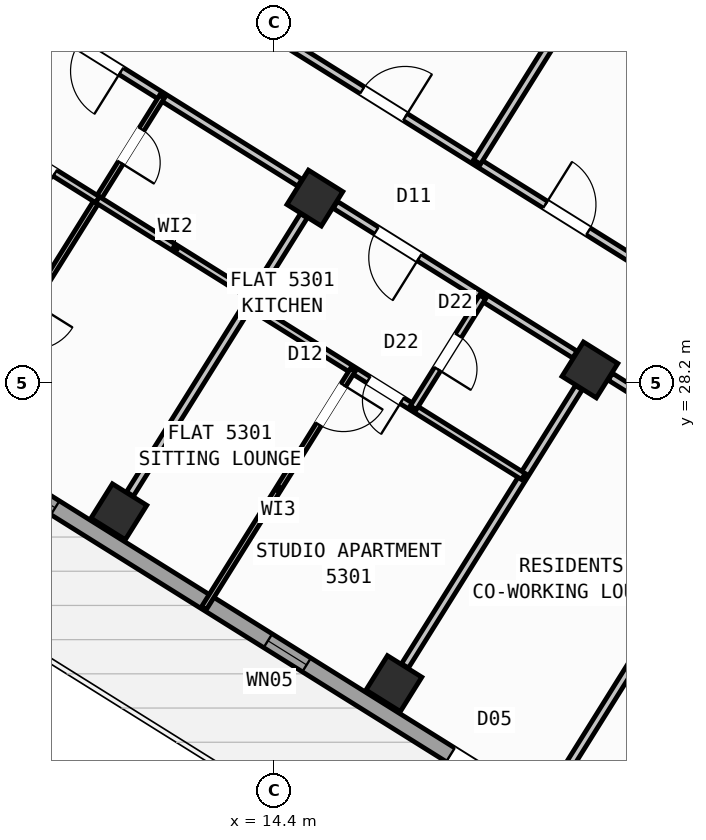
"""IFC4 building model, lengths in metres.
Left out: names, types, materials, properties, quantities, classifications, styles, units other than length and angle.
Written with IfcOpenShell. Run it as: python <this file> out.ifc"""

import sys

from ifc_helpers import new_model, si_unit, direction, frame, frame_2d, origin, origin_2d, place, context, subcontext, project, spatial, rectangle, hollow_rectangle, extrude, source, transform, mapped, element, fill, save


model = new_model("IFC4")
c1 = context("Model", 3, precision=1e-05, world=origin(), true_north=direction((0.0, 1.0)))
c2 = subcontext(c1, "Body", "Model", "MODEL_VIEW")
j1 = project(units=[si_unit("LENGTHUNIT", "METRE"), si_unit("PLANEANGLEUNIT", "RADIAN")], contexts=[c1])
p1 = place(None, origin())
s1 = spatial("IfcSite", under=j1, at=p1, CompositionType="ELEMENT")
p2 = place(p1, origin())
s2 = spatial("IfcBuilding", under=s1, at=p2, CompositionType="ELEMENT")
p3 = place(p2, frame((0.0, 0.0, 211.2)))
s3 = spatial("IfcBuildingStorey", under=s2, at=p3, CompositionType="ELEMENT", Elevation=211.2)
m1 = source(origin(), c2, "Body", "SweptSolid", [
    extrude(hollow_rectangle(XDim=0.8, YDim=0.8, WallThickness=0.032, at=origin_2d()), origin(), (0.0, 0.0, 1.0), 3.6),
])
for number, where, z_axis, x_axis in (
    (1, (20.632, 28.452, 0.0), (0.0, 0.0, 1.0), (-0.848, 0.53, 0.0)),
    (2, (16.764, 22.261, 0.0), (0.0, 0.0, 1.0), (-0.848, 0.53, 0.0)),
    (3, (15.205, 31.844, 0.0), (0.0, 0.0, 1.0), (-0.848, 0.53, 0.0)),
    (4, (11.336, 25.653, 0.0), (0.0, 0.0, 1.0), (-0.848, 0.53, 0.0)),
    (5, (9.777, 35.235, 0.0), (0.0, 0.0, 1.0), (-0.848, 0.53, 0.0)),
):
    element("IfcColumn", number, at=place(p3, frame(where, z_axis=z_axis, x_axis=x_axis)), inside=s3, PredefinedType="COLUMN", context=c2, shape_type="MappedRepresentation", body=[
        mapped(m1, transform((0.0, 0.0, 0.0), scale=1.0)),
    ])
p4 = place(p3, frame((31.76, 12.183, 0.0), z_axis=(0.0, 0.0, 1.0), x_axis=(-0.848047074256, 0.529920899612, 0.0)))
e6 = element("IfcWall", 6, at=p4, inside=s3, PredefinedType="STANDARD", context=c2, shape_type="SweptSolid", body=[
    extrude(rectangle(XDim=30.652, YDim=0.32, at=frame_2d((15.326, 0.0))), origin(), (0.0, 0.0, 1.0), 3.35),
])
p5 = place(p4, frame((15.166, 0.0, 0.0)))
e7 = element("IfcOpeningElement", 7, at=p5, cuts=e6, PredefinedType="OPENING", context=c2, shape_type="SweptSolid", body=[
    extrude(rectangle(XDim=1.2, YDim=2.15, at=frame_2d((0.6, 1.075))), frame((0.0, 0.17, 0.0), z_axis=(0.0, -1.0, 0.0), x_axis=(1.0, 0.0, 0.0)), (0.0, 0.0, 1.0), 0.34),
])
p6 = place(p4, frame((2.24, 0.0, 0.9)))
e8 = element("IfcOpeningElement", 8, at=p6, cuts=e6, PredefinedType="OPENING", context=c2, shape_type="SweptSolid", body=[
    extrude(rectangle(XDim=1.65, YDim=1.45, at=frame_2d((0.825, 0.725))), frame((0.0, 0.17, 0.0), z_axis=(0.0, -1.0, 0.0), x_axis=(1.0, 0.0, 0.0)), (0.0, 0.0, 1.0), 0.34),
])
p7 = place(p4, frame((7.469, 0.0, 0.9)))
e9 = element("IfcOpeningElement", 9, at=p7, cuts=e6, PredefinedType="OPENING", context=c2, shape_type="SweptSolid", body=[
    extrude(rectangle(XDim=1.65, YDim=1.45, at=frame_2d((0.825, 0.725))), frame((0.0, 0.17, 0.0), z_axis=(0.0, -1.0, 0.0), x_axis=(1.0, 0.0, 0.0)), (0.0, 0.0, 1.0), 0.34),
])
p8 = place(p4, frame((12.623, 0.0, 1.0)))
e10 = element("IfcOpeningElement", 10, at=p8, cuts=e6, PredefinedType="OPENING", context=c2, shape_type="SweptSolid", body=[
    extrude(rectangle(XDim=0.9, YDim=1.25, at=frame_2d((0.45, 0.625))), frame((0.0, 0.17, 0.0), z_axis=(0.0, -1.0, 0.0), x_axis=(1.0, 0.0, 0.0)), (0.0, 0.0, 1.0), 0.34),
])
p9 = place(p4, frame((19.715, 0.0, 1.0)))
e11 = element("IfcOpeningElement", 11, at=p9, cuts=e6, PredefinedType="OPENING", context=c2, shape_type="SweptSolid", body=[
    extrude(rectangle(XDim=0.9, YDim=1.25, at=frame_2d((0.45, 0.625))), frame((0.0, 0.17, 0.0), z_axis=(0.0, -1.0, 0.0), x_axis=(1.0, 0.0, 0.0)), (0.0, 0.0, 1.0), 0.34),
])
p10 = place(p4, frame((25.566, 0.0, 0.9)))
e12 = element("IfcOpeningElement", 12, at=p10, cuts=e6, PredefinedType="OPENING", context=c2, shape_type="SweptSolid", body=[
    extrude(rectangle(XDim=1.65, YDim=1.45, at=frame_2d((0.825, 0.725))), frame((0.0, 0.17, 0.0), z_axis=(0.0, -1.0, 0.0), x_axis=(1.0, 0.0, 0.0)), (0.0, 0.0, 1.0), 0.34),
])
p11 = place(p4, frame((28.896, 0.0, 1.0)))
e13 = element("IfcOpeningElement", 13, at=p11, cuts=e6, PredefinedType="OPENING", context=c2, shape_type="SweptSolid", body=[
    extrude(rectangle(XDim=0.9, YDim=1.25, at=frame_2d((0.45, 0.625))), frame((0.0, 0.17, 0.0), z_axis=(0.0, -1.0, 0.0), x_axis=(1.0, 0.0, 0.0)), (0.0, 0.0, 1.0), 0.34),
])
p12 = place(p3, frame((5.7, 28.71, 0.0), z_axis=(0.0, 0.0, 1.0), x_axis=(0.529923711467, 0.8480453172, 0.0)))
e14 = element("IfcWall", 14, at=p12, inside=s3, PredefinedType="STANDARD", context=c2, shape_type="SweptSolid", body=[
    extrude(rectangle(XDim=21.587, YDim=0.32, at=frame_2d((10.794, 0.0))), origin(), (0.0, 0.0, 1.0), 2.825),
])
p13 = place(p12, frame((2.184, 0.0, 0.9)))
e15 = element("IfcOpeningElement", 15, at=p13, cuts=e14, PredefinedType="OPENING", context=c2, shape_type="SweptSolid", body=[
    extrude(rectangle(XDim=1.65, YDim=1.45, at=frame_2d((0.825, 0.725))), frame((0.0, 0.17, 0.0), z_axis=(0.0, -1.0, 0.0), x_axis=(1.0, 0.0, 0.0)), (0.0, 0.0, 1.0), 0.34),
])
p14 = place(p12, frame((11.709, 0.0, 0.9)))
e16 = element("IfcOpeningElement", 16, at=p14, cuts=e14, PredefinedType="OPENING", context=c2, shape_type="SweptSolid", body=[
    extrude(rectangle(XDim=1.35, YDim=1.45, at=frame_2d((0.675, 0.725))), frame((0.0, 0.17, 0.0), z_axis=(0.0, -1.0, 0.0), x_axis=(1.0, 0.0, 0.0)), (0.0, 0.0, 1.0), 0.34),
])
p15 = place(p12, frame((17.181, 0.0, 0.95)))
e17 = element("IfcOpeningElement", 17, at=p15, cuts=e14, PredefinedType="OPENING", context=c2, shape_type="SweptSolid", body=[
    extrude(rectangle(XDim=1.95, YDim=1.35, at=frame_2d((0.975, 0.675))), frame((0.0, 0.17, 0.0), z_axis=(0.0, -1.0, 0.0), x_axis=(1.0, 0.0, 0.0)), (0.0, 0.0, 1.0), 0.34),
])
p16 = place(p3, frame((17.424, 47.083, 0.0), z_axis=(0.0, 0.0, 1.0), x_axis=(0.848049927979, -0.529916332693, 0.0)))
e18 = element("IfcWall", 18, at=p16, inside=s3, PredefinedType="STANDARD", context=c2, shape_type="SweptSolid", body=[
    extrude(rectangle(XDim=29.223, YDim=0.32, at=frame_2d((14.612, 0.0))), origin(), (0.0, 0.0, 1.0), 3.35),
])
p17 = place(p16, frame((2.526, 0.0, 0.0)))
e19 = element("IfcOpeningElement", 19, at=p17, cuts=e18, PredefinedType="OPENING", context=c2, shape_type="SweptSolid", body=[
    extrude(rectangle(XDim=1.05, YDim=2.15, at=frame_2d((0.525, 1.075))), frame((0.0, 0.17, 0.0), z_axis=(0.0, -1.0, 0.0), x_axis=(1.0, 0.0, 0.0)), (0.0, 0.0, 1.0), 0.34),
])
p18 = place(p16, frame((0.653, 0.0, 0.9)))
e20 = element("IfcOpeningElement", 20, at=p18, cuts=e18, PredefinedType="OPENING", context=c2, shape_type="SweptSolid", body=[
    extrude(rectangle(XDim=1.35, YDim=1.45, at=frame_2d((0.675, 0.725))), frame((0.0, 0.17, 0.0), z_axis=(0.0, -1.0, 0.0), x_axis=(1.0, 0.0, 0.0)), (0.0, 0.0, 1.0), 0.34),
])
p19 = place(p16, frame((6.897, 0.0, 1.0)))
e21 = element("IfcOpeningElement", 21, at=p19, cuts=e18, PredefinedType="OPENING", context=c2, shape_type="SweptSolid", body=[
    extrude(rectangle(XDim=0.9, YDim=1.25, at=frame_2d((0.45, 0.625))), frame((0.0, 0.17, 0.0), z_axis=(0.0, -1.0, 0.0), x_axis=(1.0, 0.0, 0.0)), (0.0, 0.0, 1.0), 0.34),
])
p20 = place(p16, frame((9.602, 0.0, 0.95)))
e22 = element("IfcOpeningElement", 22, at=p20, cuts=e18, PredefinedType="OPENING", context=c2, shape_type="SweptSolid", body=[
    extrude(rectangle(XDim=1.95, YDim=1.35, at=frame_2d((0.975, 0.675))), frame((0.0, 0.17, 0.0), z_axis=(0.0, -1.0, 0.0), x_axis=(1.0, 0.0, 0.0)), (0.0, 0.0, 1.0), 0.34),
])
p21 = place(p16, frame((14.096, 0.0, 1.0)))
e23 = element("IfcOpeningElement", 23, at=p21, cuts=e18, PredefinedType="OPENING", context=c2, shape_type="SweptSolid", body=[
    extrude(rectangle(XDim=0.9, YDim=1.25, at=frame_2d((0.45, 0.625))), frame((0.0, 0.17, 0.0), z_axis=(0.0, -1.0, 0.0), x_axis=(1.0, 0.0, 0.0)), (0.0, 0.0, 1.0), 0.34),
])
p22 = place(p16, frame((17.254, 0.0, 1.0)))
e24 = element("IfcOpeningElement", 24, at=p22, cuts=e18, PredefinedType="OPENING", context=c2, shape_type="SweptSolid", body=[
    extrude(rectangle(XDim=0.9, YDim=1.25, at=frame_2d((0.45, 0.625))), frame((0.0, 0.17, 0.0), z_axis=(0.0, -1.0, 0.0), x_axis=(1.0, 0.0, 0.0)), (0.0, 0.0, 1.0), 0.34),
])
p23 = place(p16, frame((21.139, 0.0, 0.9)))
e25 = element("IfcOpeningElement", 25, at=p23, cuts=e18, PredefinedType="OPENING", context=c2, shape_type="SweptSolid", body=[
    extrude(rectangle(XDim=1.35, YDim=1.45, at=frame_2d((0.675, 0.725))), frame((0.0, 0.17, 0.0), z_axis=(0.0, -1.0, 0.0), x_axis=(1.0, 0.0, 0.0)), (0.0, 0.0, 1.0), 0.34),
])
p24 = place(p16, frame((25.778, 0.0, 0.9)))
e26 = element("IfcOpeningElement", 26, at=p24, cuts=e18, PredefinedType="OPENING", context=c2, shape_type="SweptSolid", body=[
    extrude(rectangle(XDim=1.35, YDim=1.45, at=frame_2d((0.675, 0.725))), frame((0.0, 0.17, 0.0), z_axis=(0.0, -1.0, 0.0), x_axis=(1.0, 0.0, 0.0)), (0.0, 0.0, 1.0), 0.34),
])
p25 = place(p3, frame((23.899, 26.529, 0.0), z_axis=(0.0, 0.0, 1.0), x_axis=(-0.529920662441, -0.848047222457, 0.0)))
e27 = element("IfcWall", 27, at=p25, inside=s3, PredefinedType="PARTITIONING", context=c2, shape_type="SweptSolid", body=[
    extrude(rectangle(XDim=7.85, YDim=0.16, at=frame_2d((3.925, 0.0))), origin(), (0.0, 0.0, 1.0), 3.34),
])
p26 = place(p3, frame((25.065, 28.394, 0.0), z_axis=(0.0, 0.0, 1.0), x_axis=(-0.848048310262, 0.529918921593, 0.0)))
e28 = element("IfcWall", 28, at=p26, inside=s3, PredefinedType="PARTITIONING", context=c2, shape_type="SweptSolid", body=[
    extrude(rectangle(XDim=16.73, YDim=0.16, at=frame_2d((8.365, 0.0))), origin(), (0.0, 0.0, 1.0), 3.34),
])
p27 = place(p26, frame((1.338, 0.0, 0.0)))
e29 = element("IfcOpeningElement", 29, at=p27, cuts=e28, PredefinedType="OPENING", context=c2, shape_type="SweptSolid", body=[
    extrude(rectangle(XDim=1.0, YDim=2.1, at=frame_2d((0.5, 1.05))), frame((0.0, 0.09, 0.0), z_axis=(0.0, -1.0, 0.0), x_axis=(1.0, 0.0, 0.0)), (0.0, 0.0, 1.0), 0.18),
])
p28 = place(p26, frame((5.265, 0.0, 0.0)))
e30 = element("IfcOpeningElement", 30, at=p28, cuts=e28, PredefinedType="OPENING", context=c2, shape_type="SweptSolid", body=[
    extrude(rectangle(XDim=1.0, YDim=2.1, at=frame_2d((0.5, 1.05))), frame((0.0, 0.09, 0.0), z_axis=(0.0, -1.0, 0.0), x_axis=(1.0, 0.0, 0.0)), (0.0, 0.0, 1.0), 0.18),
])
p29 = place(p26, frame((9.526, 0.0, 0.0)))
e31 = element("IfcOpeningElement", 31, at=p29, cuts=e28, PredefinedType="OPENING", context=c2, shape_type="SweptSolid", body=[
    extrude(rectangle(XDim=1.0, YDim=2.1, at=frame_2d((0.5, 1.05))), frame((0.0, 0.09, 0.0), z_axis=(0.0, -1.0, 0.0), x_axis=(1.0, 0.0, 0.0)), (0.0, 0.0, 1.0), 0.18),
])
p30 = place(p26, frame((13.954, 0.0, 0.0)))
e32 = element("IfcOpeningElement", 32, at=p30, cuts=e28, PredefinedType="OPENING", context=c2, shape_type="SweptSolid", body=[
    extrude(rectangle(XDim=1.0, YDim=2.1, at=frame_2d((0.5, 1.05))), frame((0.0, 0.09, 0.0), z_axis=(0.0, -1.0, 0.0), x_axis=(1.0, 0.0, 0.0)), (0.0, 0.0, 1.0), 0.18),
])
p31 = place(p3, frame((23.899, 26.529, 0.0), z_axis=(0.0, 0.0, 1.0), x_axis=(-0.848055143312, 0.529907986259, 0.0)))
e33 = element("IfcWall", 33, at=p31, inside=s3, PredefinedType="PARTITIONING", context=c2, shape_type="SweptSolid", body=[
    extrude(rectangle(XDim=3.378, YDim=0.16, at=frame_2d((1.689, 0.0))), origin(), (0.0, 0.0, 1.0), 2.825),
])
p32 = place(p31, frame((1.395, 0.0, 0.0)))
e34 = element("IfcOpeningElement", 34, at=p32, cuts=e33, PredefinedType="OPENING", context=c2, shape_type="SweptSolid", body=[
    extrude(rectangle(XDim=1.0, YDim=2.1, at=frame_2d((0.5, 1.05))), frame((0.0, 0.09, 0.0), z_axis=(0.0, -1.0, 0.0), x_axis=(1.0, 0.0, 0.0)), (0.0, 0.0, 1.0), 0.18),
])
p33 = place(p3, frame((20.336, 28.755, 0.0), z_axis=(0.0, 0.0, 1.0), x_axis=(-0.848049955116, 0.529916289265, 0.0)))
e35 = element("IfcWall", 35, at=p33, inside=s3, PredefinedType="PARTITIONING", context=c2, shape_type="SweptSolid", body=[
    extrude(rectangle(XDim=5.576, YDim=0.16, at=frame_2d((2.788, 0.0))), origin(), (0.0, 0.0, 1.0), 2.825),
])
p34 = place(p33, frame((3.618, 0.0, 0.0)))
e36 = element("IfcOpeningElement", 36, at=p34, cuts=e35, PredefinedType="OPENING", context=c2, shape_type="SweptSolid", body=[
    extrude(rectangle(XDim=1.0, YDim=2.1, at=frame_2d((0.5, 1.05))), frame((0.0, 0.09, 0.0), z_axis=(0.0, -1.0, 0.0), x_axis=(1.0, 0.0, 0.0)), (0.0, 0.0, 1.0), 0.18),
])
p35 = place(p3, frame((14.908, 32.147, 0.0), z_axis=(0.0, 0.0, 1.0), x_axis=(-0.848049955116, 0.529916289265, 0.0)))
e37 = element("IfcWall", 37, at=p35, inside=s3, PredefinedType="PARTITIONING", context=c2, shape_type="SweptSolid", body=[
    extrude(rectangle(XDim=5.576, YDim=0.16, at=frame_2d((2.788, 0.0))), origin(), (0.0, 0.0, 1.0), 2.825),
])
p36 = place(p35, frame((4.158, 0.0, 0.0)))
e38 = element("IfcOpeningElement", 38, at=p36, cuts=e37, PredefinedType="OPENING", context=c2, shape_type="SweptSolid", body=[
    extrude(rectangle(XDim=1.0, YDim=2.1, at=frame_2d((0.5, 1.05))), frame((0.0, 0.09, 0.0), z_axis=(0.0, -1.0, 0.0), x_axis=(1.0, 0.0, 0.0)), (0.0, 0.0, 1.0), 0.18),
])
p37 = place(p3, frame((20.414, 28.103, 0.0), z_axis=(0.0, 0.0, 1.0), x_axis=(-0.529934553702, -0.848038542045, 0.0)))
e39 = element("IfcWall", 39, at=p37, inside=s3, PredefinedType="PARTITIONING", context=c2, shape_type="SweptSolid", body=[
    extrude(rectangle(XDim=6.476, YDim=0.16, at=frame_2d((3.238, 0.0))), origin(), (0.0, 0.0, 1.0), 2.825),
])
p38 = place(p3, frame((14.986, 31.494, 0.0), z_axis=(0.0, 0.0, 1.0), x_axis=(-0.529907440938, -0.848055484057, 0.0)))
e40 = element("IfcWall", 40, at=p38, inside=s3, PredefinedType="PARTITIONING", context=c2, shape_type="SweptSolid", body=[
    extrude(rectangle(XDim=6.476, YDim=0.16, at=frame_2d((3.238, 0.0))), origin(), (0.0, 0.0, 1.0), 2.825),
])
p39 = place(p3, frame((19.318, 26.349, 0.0), z_axis=(0.0, 0.0, 1.0), x_axis=(-0.848039019877, 0.529933789039, 0.0)))
e41 = element("IfcWall", 41, at=p39, inside=s3, PredefinedType="PLUMBINGWALL", context=c2, shape_type="SweptSolid", body=[
    extrude(rectangle(XDim=6.4, YDim=0.14, at=frame_2d((3.2, 0.0))), origin(), (0.0, 0.0, 1.0), 3.34),
])
p40 = place(p39, frame((2.824, 0.0, 0.0)))
e42 = element("IfcOpeningElement", 42, at=p40, cuts=e41, PredefinedType="OPENING", context=c2, shape_type="SweptSolid", body=[
    extrude(rectangle(XDim=0.78, YDim=2.05, at=frame_2d((0.39, 1.025))), frame((0.0, 0.08, 0.0), z_axis=(0.0, -1.0, 0.0), x_axis=(1.0, 0.0, 0.0)), (0.0, 0.0, 1.0), 0.16),
])
p41 = place(p3, frame((18.514, 29.894, 0.0), z_axis=(0.0, 0.0, 1.0), x_axis=(-0.529913878929, -0.848051461244, 0.0)))
e43 = element("IfcWall", 43, at=p41, inside=s3, PredefinedType="PLUMBINGWALL", context=c2, shape_type="SweptSolid", body=[
    extrude(rectangle(XDim=2.58, YDim=0.14, at=frame_2d((1.29, 0.0))), origin(), (0.0, 0.0, 1.0), 3.34),
])
p42 = place(p41, frame((0.9, 0.0, 0.0)))
e44 = element("IfcOpeningElement", 44, at=p42, cuts=e43, PredefinedType="OPENING", context=c2, shape_type="SweptSolid", body=[
    extrude(rectangle(XDim=0.78, YDim=2.05, at=frame_2d((0.39, 1.025))), frame((0.0, 0.08, 0.0), z_axis=(0.0, -1.0, 0.0), x_axis=(1.0, 0.0, 0.0)), (0.0, 0.0, 1.0), 0.16),
])
p43 = place(p3, frame((15.953, 28.452, 0.0), z_axis=(0.0, 0.0, 1.0), x_axis=(-0.529919714018, -0.848047815099, 0.0)))
e45 = element("IfcWall", 45, at=p43, inside=s3, PredefinedType="PARTITIONING", context=c2, shape_type="SweptSolid", body=[
    extrude(rectangle(XDim=5.54, YDim=0.11, at=frame_2d((2.77, 0.0))), origin(), (0.0, 0.0, 1.0), 3.34),
])
p44 = place(p43, frame((0.35, 0.0, 0.0)))
e46 = element("IfcOpeningElement", 46, at=p44, cuts=e45, PredefinedType="OPENING", context=c2, shape_type="SweptSolid", body=[
    extrude(rectangle(XDim=0.92, YDim=2.08, at=frame_2d((0.46, 1.04))), frame((0.0, 0.065, 0.0), z_axis=(0.0, -1.0, 0.0), x_axis=(1.0, 0.0, 0.0)), (0.0, 0.0, 1.0), 0.13),
])
p45 = place(p3, frame((12.188, 33.847, 0.0), z_axis=(0.0, 0.0, 1.0), x_axis=(-0.529917860021, -0.848048973604, 0.0)))
e47 = element("IfcWall", 47, at=p45, inside=s3, PredefinedType="PARTITIONING", context=c2, shape_type="SweptSolid", body=[
    extrude(rectangle(XDim=8.12, YDim=0.11, at=frame_2d((4.06, 0.0))), origin(), (0.0, 0.0, 1.0), 3.34),
])
p46 = place(p45, frame((0.76, 0.0, 0.0)))
e48 = element("IfcOpeningElement", 48, at=p46, cuts=e47, PredefinedType="OPENING", context=c2, shape_type="SweptSolid", body=[
    extrude(rectangle(XDim=0.78, YDim=2.05, at=frame_2d((0.39, 1.025))), frame((0.0, 0.065, 0.0), z_axis=(0.0, -1.0, 0.0), x_axis=(1.0, 0.0, 0.0)), (0.0, 0.0, 1.0), 0.13),
])
p47 = place(p45, frame((4.8, 0.0, 0.0)))
e49 = element("IfcOpeningElement", 49, at=p47, cuts=e47, PredefinedType="OPENING", context=c2, shape_type="SweptSolid", body=[
    extrude(rectangle(XDim=0.92, YDim=2.08, at=frame_2d((0.46, 1.04))), frame((0.0, 0.065, 0.0), z_axis=(0.0, -1.0, 0.0), x_axis=(1.0, 0.0, 0.0)), (0.0, 0.0, 1.0), 0.13),
])
p48 = place(p3, frame((10.916, 31.811, 0.0), z_axis=(0.0, 0.0, 1.0), x_axis=(-0.84802195137, 0.529961102341, 0.0)))
e50 = element("IfcWall", 50, at=p48, inside=s3, PredefinedType="PLUMBINGWALL", context=c2, shape_type="SweptSolid", body=[
    extrude(rectangle(XDim=2.9, YDim=0.14, at=frame_2d((1.45, 0.0))), origin(), (0.0, 0.0, 1.0), 3.34),
])
p49 = place(p48, frame((0.99, 0.0, 0.0)))
e51 = element("IfcOpeningElement", 51, at=p49, cuts=e50, PredefinedType="OPENING", context=c2, shape_type="SweptSolid", body=[
    extrude(rectangle(XDim=0.92, YDim=2.08, at=frame_2d((0.46, 1.04))), frame((0.0, 0.08, 0.0), z_axis=(0.0, -1.0, 0.0), x_axis=(1.0, 0.0, 0.0)), (0.0, 0.0, 1.0), 0.16),
])
p50 = place(p3, frame((13.986, 29.893, 0.0), z_axis=(0.0, 0.0, 1.0), x_axis=(-0.848051346257, 0.52991406295, 0.0)))
e52 = element("IfcWall", 52, at=p50, inside=s3, PredefinedType="PLUMBINGWALL", context=c2, shape_type="SweptSolid", body=[
    extrude(rectangle(XDim=3.62, YDim=0.14, at=frame_2d((1.81, 0.0))), origin(), (0.0, 0.0, 1.0), 3.34),
])
p51 = place(p3, frame((24.578, 42.436, 0.0), z_axis=(0.0, 0.0, 1.0), x_axis=(-0.529916055051, -0.848050101468, 0.0)))
e53 = element("IfcWall", 53, at=p51, inside=s3, PredefinedType="PARTITIONING", context=c2, shape_type="SweptSolid", body=[
    extrude(rectangle(XDim=11.65, YDim=0.16, at=frame_2d((5.825, 0.0))), origin(), (0.0, 0.0, 1.0), 2.995),
])
m2 = source(origin(), c2, "Body", "SweptSolid", [
    extrude(rectangle(XDim=1.2, YDim=2.15, at=frame_2d((0.6, 1.075))), frame((0.0, 0.025, 0.0), z_axis=(0.0, -1.0, 0.0), x_axis=(1.0, 0.0, 0.0)), (0.0, 0.0, 1.0), 0.05),
])
p52 = place(p5, origin())
e54 = element("IfcDoor", 54, at=p52, inside=s3, OperationType="SINGLE_SWING_LEFT", PredefinedType="DOOR", context=c2, shape_type="MappedRepresentation", body=[
    mapped(m2, transform((0.0, 0.0, 0.0), scale=1.0)),
])
fill(e7, e54)
m3 = source(origin(), c2, "Body", "SweptSolid", [
    extrude(rectangle(XDim=0.9, YDim=1.25, at=frame_2d((0.45, 0.625))), frame((0.0, 0.03, 0.0), z_axis=(0.0, -1.0, 0.0), x_axis=(1.0, 0.0, 0.0)), (0.0, 0.0, 1.0), 0.06),
])
p53 = place(p9, origin())
e55 = element("IfcWindow", 55, at=p53, inside=s3, PartitioningType="SINGLE_PANEL", PredefinedType="WINDOW", context=c2, shape_type="MappedRepresentation", body=[
    mapped(m3, transform((0.0, 0.0, 0.0), scale=1.0)),
])
fill(e11, e55)
m4 = source(origin(), c2, "Body", "SweptSolid", [
    extrude(rectangle(XDim=1.65, YDim=1.45, at=frame_2d((0.825, 0.725))), frame((0.0, 0.03, 0.0), z_axis=(0.0, -1.0, 0.0), x_axis=(1.0, 0.0, 0.0)), (0.0, 0.0, 1.0), 0.06),
])
p54 = place(p10, origin())
e56 = element("IfcWindow", 56, at=p54, inside=s3, PartitioningType="SINGLE_PANEL", PredefinedType="WINDOW", context=c2, shape_type="MappedRepresentation", body=[
    mapped(m4, transform((0.0, 0.0, 0.0), scale=1.0)),
])
fill(e12, e56)
m5 = source(origin(), c2, "Body", "SweptSolid", [
    extrude(rectangle(XDim=0.92, YDim=2.08, at=frame_2d((0.46, 1.04))), frame((0.0, 0.025, 0.0), z_axis=(0.0, -1.0, 0.0), x_axis=(1.0, 0.0, 0.0)), (0.0, 0.0, 1.0), 0.05),
])
p55 = place(p44, origin())
e57 = element("IfcDoor", 57, at=p55, inside=s3, OperationType="SINGLE_SWING_LEFT", PredefinedType="DOOR", context=c2, shape_type="MappedRepresentation", body=[
    mapped(m5, transform((0.0, 0.0, 0.0), scale=1.0)),
])
fill(e46, e57)
m6 = source(origin(), c2, "Body", "SweptSolid", [
    extrude(rectangle(XDim=1.0, YDim=2.1, at=frame_2d((0.5, 1.05))), frame((0.0, 0.025, 0.0), z_axis=(0.0, -1.0, 0.0), x_axis=(1.0, 0.0, 0.0)), (0.0, 0.0, 1.0), 0.05),
])
p56 = place(p34, origin())
e58 = element("IfcDoor", 58, at=p56, inside=s3, OperationType="SINGLE_SWING_LEFT", PredefinedType="DOOR", context=c2, shape_type="MappedRepresentation", body=[
    mapped(m6, transform((0.0, 0.0, 0.0), scale=1.0)),
])
fill(e36, e58)
m7 = source(origin(), c2, "Body", "SweptSolid", [
    extrude(rectangle(XDim=0.78, YDim=2.05, at=frame_2d((0.39, 1.025))), frame((0.0, 0.025, 0.0), z_axis=(0.0, -1.0, 0.0), x_axis=(1.0, 0.0, 0.0)), (0.0, 0.0, 1.0), 0.05),
])
p57 = place(p40, origin())
e59 = element("IfcDoor", 59, at=p57, inside=s3, OperationType="SINGLE_SWING_LEFT", PredefinedType="DOOR", context=c2, shape_type="MappedRepresentation", body=[
    mapped(m7, transform((0.0, 0.0, 0.0), scale=1.0)),
])
fill(e42, e59)
p58 = place(p42, origin())
e60 = element("IfcDoor", 60, at=p58, inside=s3, OperationType="SINGLE_SWING_RIGHT", PredefinedType="DOOR", context=c2, shape_type="MappedRepresentation", body=[
    mapped(m7, transform((0.0, 0.0, 0.0), scale=1.0)),
])
fill(e44, e60)
p59 = place(p36, origin())
e61 = element("IfcDoor", 61, at=p59, inside=s3, OperationType="SINGLE_SWING_LEFT", PredefinedType="DOOR", context=c2, shape_type="MappedRepresentation", body=[
    mapped(m6, transform((0.0, 0.0, 0.0), scale=1.0)),
])
fill(e38, e61)
p60 = place(p49, origin())
e62 = element("IfcDoor", 62, at=p60, inside=s3, OperationType="SINGLE_SWING_LEFT", PredefinedType="DOOR", context=c2, shape_type="MappedRepresentation", body=[
    mapped(m5, transform((0.0, 0.0, 0.0), scale=1.0)),
])
fill(e51, e62)
p61 = place(p46, origin())
e63 = element("IfcDoor", 63, at=p61, inside=s3, OperationType="SINGLE_SWING_RIGHT", PredefinedType="DOOR", context=c2, shape_type="MappedRepresentation", body=[
    mapped(m7, transform((0.0, 0.0, 0.0), scale=1.0)),
])
fill(e48, e63)
p62 = place(p28, frame((1.0, 0.0, 0.0), z_axis=(0.0, 0.0, 1.0), x_axis=(-1.0, 0.0, 0.0)))
e64 = element("IfcDoor", 64, at=p62, inside=s3, OperationType="SINGLE_SWING_LEFT", PredefinedType="DOOR", context=c2, shape_type="MappedRepresentation", body=[
    mapped(m6, transform((0.0, 0.0, 0.0), scale=1.0)),
])
fill(e30, e64)
p63 = place(p29, frame((1.0, 0.0, 0.0), z_axis=(0.0, 0.0, 1.0), x_axis=(-1.0, 0.0, 0.0)))
e65 = element("IfcDoor", 65, at=p63, inside=s3, OperationType="SINGLE_SWING_RIGHT", PredefinedType="DOOR", context=c2, shape_type="MappedRepresentation", body=[
    mapped(m6, transform((0.0, 0.0, 0.0), scale=1.0)),
])
fill(e31, e65)
save(model, sys.argv[1])
